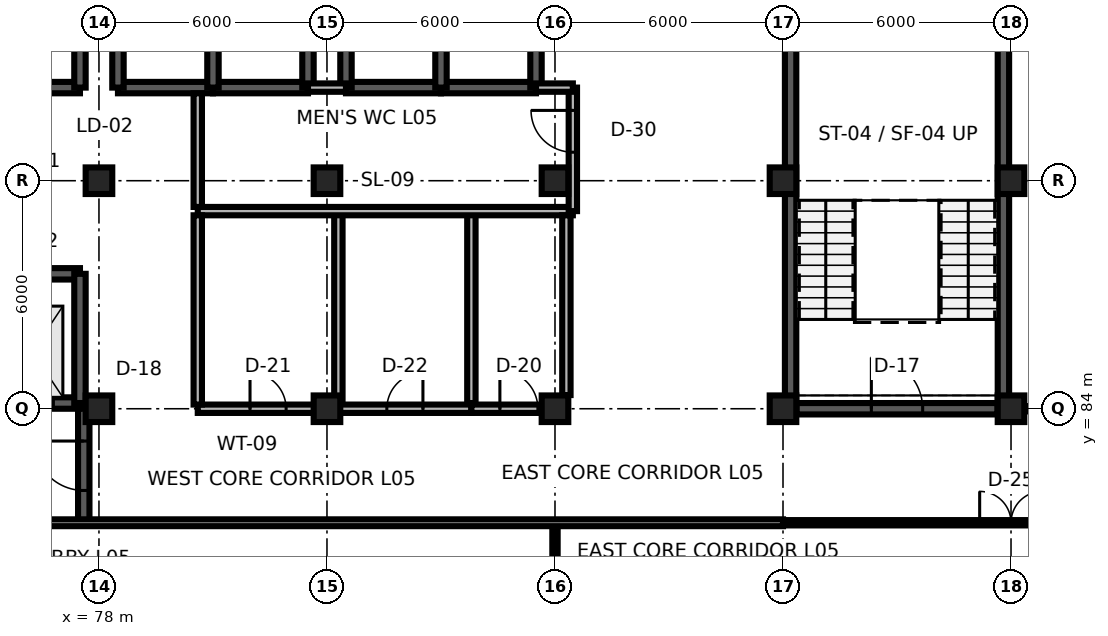
"""IFC4 building model, lengths in metres.
Left out: names, types, materials, properties, quantities, classifications, styles, units other than length and angle.
Written with IfcOpenShell. Run it as: python <this file> out.ifc"""

import sys

from ifc_helpers import new_model, si_unit, direction, frame, frame_2d, origin, origin_2d, place, context, subcontext, project, spatial, rectangle, extrude, element, fill, save


model = new_model("IFC4")
c1 = context("Model", 3, precision=1e-05, world=origin(), true_north=direction((0.0, 1.0)))
c2 = subcontext(c1, "Body", "Model", "MODEL_VIEW")
j1 = project(units=[si_unit("LENGTHUNIT", "METRE"), si_unit("PLANEANGLEUNIT", "RADIAN")], contexts=[c1])
p1 = place(None, origin())
s1 = spatial("IfcSite", under=j1, at=p1, CompositionType="ELEMENT")
p2 = place(p1, origin())
s2 = spatial("IfcBuilding", under=s1, at=p2, CompositionType="ELEMENT")
p3 = place(p2, frame((0.0, 0.0, 21.0)))
s3 = spatial("IfcBuildingStorey", under=s2, at=p3, CompositionType="ELEMENT", Elevation=21.0)
for number, where, z_axis, x_axis in (
    (1, (78.0, 84.0, 0.0), (0.0, 0.0, 1.0), (1.0, 0.0, 0.0)),
    (2, (84.0, 84.0, 0.0), (0.0, 0.0, 1.0), (1.0, 0.0, 0.0)),
    (3, (90.0, 84.0, 0.0), (0.0, 0.0, 1.0), (1.0, 0.0, 0.0)),
    (4, (96.0, 84.0, 0.0), (0.0, 0.0, 1.0), (1.0, 0.0, 0.0)),
    (5, (102.0, 84.0, 0.0), (0.0, 0.0, 1.0), (1.0, 0.0, 0.0)),
    (6, (78.0, 90.0, 0.0), (0.0, 0.0, 1.0), (1.0, 0.0, 0.0)),
    (7, (84.0, 90.0, 0.0), (0.0, 0.0, 1.0), (1.0, 0.0, 0.0)),
    (8, (90.0, 90.0, 0.0), (0.0, 0.0, 1.0), (1.0, 0.0, 0.0)),
    (9, (96.0, 90.0, 0.0), (0.0, 0.0, 1.0), (1.0, 0.0, 0.0)),
    (10, (102.0, 90.0, 0.0), (0.0, 0.0, 1.0), (1.0, 0.0, 0.0)),
):
    element("IfcColumn", number, at=place(p3, frame(where, z_axis=z_axis, x_axis=x_axis)), inside=s3, PredefinedType="COLUMN", context=c2, shape_type="SweptSolid", body=[
        extrude(rectangle(XDim=0.7, YDim=0.7, at=origin_2d()), origin(), (0.0, 0.0, 1.0), 3.9),
    ])
p4 = place(p3, frame((96.35, 84.0, 0.0), z_axis=(0.0, 0.0, 1.0), x_axis=(1.0, 0.0, 0.0)))
e11 = element("IfcWall", 11, at=p4, inside=s3, PredefinedType="SHEAR", context=c2, shape_type="SweptSolid", body=[
    extrude(rectangle(XDim=5.3, YDim=0.3, at=frame_2d((2.65, 0.0))), origin(), (0.0, 0.0, 1.0), 3.66),
])
p5 = place(p4, frame((1.975, 0.0, 0.0)))
e12 = element("IfcOpeningElement", 12, at=p5, cuts=e11, PredefinedType="OPENING", context=c2, shape_type="SweptSolid", body=[
    extrude(rectangle(XDim=1.35, YDim=2.2, at=frame_2d((0.675, 1.1))), frame((0.0, 0.165, 0.0), z_axis=(0.0, -1.0, 0.0), x_axis=(1.0, 0.0, 0.0)), (0.0, 0.0, 1.0), 0.33),
])
for number, where, z_axis, x_axis in (
    (13, (96.2, 84.0, 0.0), (0.0, 0.0, 1.0), (0.0, 1.0, 0.0)),
    (14, (101.8, 84.0, 0.0), (0.0, 0.0, 1.0), (0.0, 1.0, 0.0)),
):
    element("IfcWall", number, at=place(p3, frame(where, z_axis=z_axis, x_axis=x_axis)), inside=s3, PredefinedType="SHEAR", context=c2, shape_type="SweptSolid", body=[
        extrude(rectangle(XDim=11.8, YDim=0.3, at=frame_2d((5.9, 0.0))), origin(), (0.0, 0.0, 1.0), 3.74),
    ])
p6 = place(p3, frame((75.0, 84.15, 0.0), z_axis=(0.0, 0.0, 1.0), x_axis=(1.0, 0.0, 0.0)))
e15 = element("IfcWall", 15, at=p6, inside=s3, PredefinedType="SHEAR", context=c2, shape_type="SweptSolid", body=[
    extrude(rectangle(XDim=2.5, YDim=0.3, at=frame_2d((1.25, 0.0))), origin(), (0.0, 0.0, 1.0), 3.74),
])
p7 = place(p6, frame((0.7, 0.0, 0.0)))
e16 = element("IfcOpeningElement", 16, at=p7, cuts=e15, PredefinedType="OPENING", context=c2, shape_type="SweptSolid", body=[
    extrude(rectangle(XDim=1.1, YDim=2.1, at=frame_2d((0.55, 1.05))), frame((0.0, 0.165, 0.0), z_axis=(0.0, -1.0, 0.0), x_axis=(1.0, 0.0, 0.0)), (0.0, 0.0, 1.0), 0.33),
])
p8 = place(p3, frame((75.0, 87.55, 0.0), z_axis=(0.0, 0.0, 1.0), x_axis=(1.0, 0.0, 0.0)))
e17 = element("IfcWall", 17, at=p8, inside=s3, PredefinedType="SHEAR", context=c2, shape_type="SweptSolid", body=[
    extrude(rectangle(XDim=2.5, YDim=0.3, at=frame_2d((1.25, 0.0))), origin(), (0.0, 0.0, 1.0), 3.74),
])
p9 = place(p3, frame((77.5, 84.15, 0.0), z_axis=(0.0, 0.0, 1.0), x_axis=(0.0, 1.0, 0.0)))
e18 = element("IfcWall", 18, at=p9, inside=s3, PredefinedType="SHEAR", context=c2, shape_type="SweptSolid", body=[
    extrude(rectangle(XDim=3.4, YDim=0.3, at=frame_2d((1.7, 0.0))), origin(), (0.0, 0.0, 1.0), 3.74),
])
p10 = place(p3, frame((75.0, 92.45, 0.0), z_axis=(0.0, 0.0, 1.0), x_axis=(1.0, 0.0, 0.0)))
e19 = element("IfcWall", 19, at=p10, inside=s3, PredefinedType="SHEAR", context=c2, shape_type="SweptSolid", body=[
    extrude(rectangle(XDim=2.5, YDim=0.3, at=frame_2d((1.25, 0.0))), origin(), (0.0, 0.0, 1.0), 3.74),
])
p11 = place(p3, frame((77.5, 92.45, 0.0), z_axis=(0.0, 0.0, 1.0), x_axis=(0.0, 1.0, 0.0)))
e20 = element("IfcWall", 20, at=p11, inside=s3, PredefinedType="SHEAR", context=c2, shape_type="SweptSolid", body=[
    extrude(rectangle(XDim=3.4, YDim=0.3, at=frame_2d((1.7, 0.0))), origin(), (0.0, 0.0, 1.0), 3.74),
])
p12 = place(p3, frame((78.5, 92.45, 0.0), z_axis=(0.0, 0.0, 1.0), x_axis=(1.0, 0.0, 0.0)))
e21 = element("IfcWall", 21, at=p12, inside=s3, PredefinedType="SHEAR", context=c2, shape_type="SweptSolid", body=[
    extrude(rectangle(XDim=2.5, YDim=0.3, at=frame_2d((1.25, 0.0))), origin(), (0.0, 0.0, 1.0), 3.74),
])
p13 = place(p3, frame((78.5, 92.45, 0.0), z_axis=(0.0, 0.0, 1.0), x_axis=(0.0, 1.0, 0.0)))
e22 = element("IfcWall", 22, at=p13, inside=s3, PredefinedType="SHEAR", context=c2, shape_type="SweptSolid", body=[
    extrude(rectangle(XDim=3.4, YDim=0.3, at=frame_2d((1.7, 0.0))), origin(), (0.0, 0.0, 1.0), 3.74),
])
p14 = place(p3, frame((81.0, 92.45, 0.0), z_axis=(0.0, 0.0, 1.0), x_axis=(1.0, 0.0, 0.0)))
e23 = element("IfcWall", 23, at=p14, inside=s3, PredefinedType="SHEAR", context=c2, shape_type="SweptSolid", body=[
    extrude(rectangle(XDim=2.5, YDim=0.3, at=frame_2d((1.25, 0.0))), origin(), (0.0, 0.0, 1.0), 3.74),
])
for number, where, z_axis, x_axis in (
    (24, (81.0, 92.45, 0.0), (0.0, 0.0, 1.0), (0.0, 1.0, 0.0)),
    (25, (83.5, 92.45, 0.0), (0.0, 0.0, 1.0), (0.0, 1.0, 0.0)),
):
    element("IfcWall", number, at=place(p3, frame(where, z_axis=z_axis, x_axis=x_axis)), inside=s3, PredefinedType="SHEAR", context=c2, shape_type="SweptSolid", body=[
        extrude(rectangle(XDim=3.4, YDim=0.3, at=frame_2d((1.7, 0.0))), origin(), (0.0, 0.0, 1.0), 3.74),
    ])
p15 = place(p3, frame((84.5, 92.45, 0.0), z_axis=(0.0, 0.0, 1.0), x_axis=(1.0, 0.0, 0.0)))
e26 = element("IfcWall", 26, at=p15, inside=s3, PredefinedType="SHEAR", context=c2, shape_type="SweptSolid", body=[
    extrude(rectangle(XDim=2.5, YDim=0.3, at=frame_2d((1.25, 0.0))), origin(), (0.0, 0.0, 1.0), 3.74),
])
p16 = place(p3, frame((84.5, 92.45, 0.0), z_axis=(0.0, 0.0, 1.0), x_axis=(0.0, 1.0, 0.0)))
e27 = element("IfcWall", 27, at=p16, inside=s3, PredefinedType="SHEAR", context=c2, shape_type="SweptSolid", body=[
    extrude(rectangle(XDim=3.4, YDim=0.3, at=frame_2d((1.7, 0.0))), origin(), (0.0, 0.0, 1.0), 3.74),
])
p17 = place(p3, frame((87.0, 92.45, 0.0), z_axis=(0.0, 0.0, 1.0), x_axis=(1.0, 0.0, 0.0)))
e28 = element("IfcWall", 28, at=p17, inside=s3, PredefinedType="SHEAR", context=c2, shape_type="SweptSolid", body=[
    extrude(rectangle(XDim=2.5, YDim=0.3, at=frame_2d((1.25, 0.0))), origin(), (0.0, 0.0, 1.0), 3.74),
])
for number, where, z_axis, x_axis in (
    (29, (87.0, 92.45, 0.0), (0.0, 0.0, 1.0), (0.0, 1.0, 0.0)),
    (30, (89.5, 92.45, 0.0), (0.0, 0.0, 1.0), (0.0, 1.0, 0.0)),
):
    element("IfcWall", number, at=place(p3, frame(where, z_axis=z_axis, x_axis=x_axis)), inside=s3, PredefinedType="SHEAR", context=c2, shape_type="SweptSolid", body=[
        extrude(rectangle(XDim=3.4, YDim=0.3, at=frame_2d((1.7, 0.0))), origin(), (0.0, 0.0, 1.0), 3.74),
    ])
p18 = place(p3, frame((77.6, 81.0, 0.0), z_axis=(0.0, 0.0, 1.0), x_axis=(0.0, 1.0, 0.0)))
e31 = element("IfcWall", 31, at=p18, inside=s3, PredefinedType="SHEAR", context=c2, shape_type="SweptSolid", body=[
    extrude(rectangle(XDim=3.0, YDim=0.3, at=frame_2d((1.5, 0.0))), origin(), (0.0, 0.0, 1.0), 3.7),
])
p19 = place(p18, frame((0.85, 0.0, 0.0)))
e32 = element("IfcOpeningElement", 32, at=p19, cuts=e31, PredefinedType="OPENING", context=c2, shape_type="SweptSolid", body=[
    extrude(rectangle(XDim=1.3, YDim=2.2, at=frame_2d((0.65, 1.1))), frame((0.0, 0.165, 0.0), z_axis=(0.0, -1.0, 0.0), x_axis=(1.0, 0.0, 0.0)), (0.0, 0.0, 1.0), 0.33),
])
p20 = place(p3, frame((80.6, 84.0, 0.0), z_axis=(0.0, 0.0, 1.0), x_axis=(1.0, 0.0, 0.0)))
e33 = element("IfcWall", 33, at=p20, inside=s3, PredefinedType="PARTITIONING", context=c2, shape_type="SweptSolid", body=[
    extrude(rectangle(XDim=3.7, YDim=0.22, at=frame_2d((1.85, 0.0))), origin(), (0.0, 0.0, 1.0), 3.312),
])
p21 = place(p20, frame((1.375, 0.0, 0.0)))
e34 = element("IfcOpeningElement", 34, at=p21, cuts=e33, PredefinedType="OPENING", context=c2, shape_type="SweptSolid", body=[
    extrude(rectangle(XDim=0.95, YDim=2.15, at=frame_2d((0.475, 1.075))), frame((0.0, 0.125, 0.0), z_axis=(0.0, -1.0, 0.0), x_axis=(1.0, 0.0, 0.0)), (0.0, 0.0, 1.0), 0.25),
])
p22 = place(p3, frame((84.3, 84.0, 0.0), z_axis=(0.0, 0.0, 1.0), x_axis=(1.0, 0.0, 0.0)))
e35 = element("IfcWall", 35, at=p22, inside=s3, PredefinedType="PARTITIONING", context=c2, shape_type="SweptSolid", body=[
    extrude(rectangle(XDim=3.5, YDim=0.22, at=frame_2d((1.75, 0.0))), origin(), (0.0, 0.0, 1.0), 3.312),
])
p23 = place(p22, frame((1.275, 0.0, 0.0)))
e36 = element("IfcOpeningElement", 36, at=p23, cuts=e35, PredefinedType="OPENING", context=c2, shape_type="SweptSolid", body=[
    extrude(rectangle(XDim=0.95, YDim=2.1, at=frame_2d((0.475, 1.05))), frame((0.0, 0.125, 0.0), z_axis=(0.0, -1.0, 0.0), x_axis=(1.0, 0.0, 0.0)), (0.0, 0.0, 1.0), 0.25),
])
p24 = place(p3, frame((87.8, 84.0, 0.0), z_axis=(0.0, 0.0, 1.0), x_axis=(1.0, 0.0, 0.0)))
e37 = element("IfcWall", 37, at=p24, inside=s3, PredefinedType="PARTITIONING", context=c2, shape_type="SweptSolid", body=[
    extrude(rectangle(XDim=2.5, YDim=0.22, at=frame_2d((1.25, 0.0))), origin(), (0.0, 0.0, 1.0), 3.312),
])
p25 = place(p24, frame((0.75, 0.0, 0.0)))
e38 = element("IfcOpeningElement", 38, at=p25, cuts=e37, PredefinedType="OPENING", context=c2, shape_type="SweptSolid", body=[
    extrude(rectangle(XDim=1.0, YDim=2.15, at=frame_2d((0.5, 1.075))), frame((0.0, 0.125, 0.0), z_axis=(0.0, -1.0, 0.0), x_axis=(1.0, 0.0, 0.0)), (0.0, 0.0, 1.0), 0.25),
])
for number, where, z_axis, x_axis in (
    (39, (84.3, 84.15, 0.0), (0.0, 0.0, 1.0), (0.0, 1.0, 0.0)),
    (40, (87.8, 84.15, 0.0), (0.0, 0.0, 1.0), (0.0, 1.0, 0.0)),
):
    element("IfcWall", number, at=place(p3, frame(where, z_axis=z_axis, x_axis=x_axis)), inside=s3, PredefinedType="PARTITIONING", context=c2, shape_type="SweptSolid", body=[
        extrude(rectangle(XDim=5.0, YDim=0.22, at=frame_2d((2.5, 0.0))), origin(), (0.0, 0.0, 1.0), 3.7),
    ])
p26 = place(p3, frame((80.6, 89.2, 0.0), z_axis=(0.0, 0.0, 1.0), x_axis=(1.0, 0.0, 0.0)))
e41 = element("IfcWall", 41, at=p26, inside=s3, PredefinedType="PARTITIONING", context=c2, shape_type="SweptSolid", body=[
    extrude(rectangle(XDim=9.87, YDim=0.22, at=frame_2d((4.935, 0.0))), origin(), (0.0, 0.0, 1.0), 3.7),
])
p27 = place(p3, frame((90.47, 89.2, 0.0), z_axis=(0.0, 0.0, 1.0), x_axis=(0.0, 1.0, 0.0)))
e42 = element("IfcWall", 42, at=p27, inside=s3, PredefinedType="PARTITIONING", context=c2, shape_type="SweptSolid", body=[
    extrude(rectangle(XDim=3.25, YDim=0.22, at=frame_2d((1.625, 0.0))), origin(), (0.0, 0.0, 1.0), 3.7),
])
p28 = place(p27, frame((1.55, 0.0, 0.0)))
e43 = element("IfcOpeningElement", 43, at=p28, cuts=e42, PredefinedType="OPENING", context=c2, shape_type="SweptSolid", body=[
    extrude(rectangle(XDim=1.1, YDim=2.15, at=frame_2d((0.55, 1.075))), frame((0.0, 0.125, 0.0), z_axis=(0.0, -1.0, 0.0), x_axis=(1.0, 0.0, 0.0)), (0.0, 0.0, 1.0), 0.25),
])
p29 = place(p3, frame((96.0, 81.0, 0.0), z_axis=(0.0, 0.0, 1.0), x_axis=(1.0, 0.0, 0.0)))
e44 = element("IfcWall", 44, at=p29, inside=s3, PredefinedType="PARTITIONING", context=c2, shape_type="SweptSolid", body=[
    extrude(rectangle(XDim=12.0, YDim=0.14, at=frame_2d((6.0, 0.0))), origin(), (0.0, 0.0, 1.0), 3.7),
])
p30 = place(p29, frame((5.175, 0.0, 0.0)))
e45 = element("IfcOpeningElement", 45, at=p30, cuts=e44, PredefinedType="OPENING", context=c2, shape_type="SweptSolid", body=[
    extrude(rectangle(XDim=1.65, YDim=2.35, at=frame_2d((0.825, 1.175))), frame((0.0, 0.085, 0.0), z_axis=(0.0, -1.0, 0.0), x_axis=(1.0, 0.0, 0.0)), (0.0, 0.0, 1.0), 0.17),
])
p31 = place(p3, frame((102.0, 84.0, 0.0), z_axis=(0.0, 0.0, 1.0), x_axis=(1.0, 0.0, 0.0)))
e46 = element("IfcWall", 46, at=p31, inside=s3, PredefinedType="PARTITIONING", context=c2, shape_type="SweptSolid", body=[
    extrude(rectangle(XDim=6.0, YDim=0.14, at=frame_2d((3.0, 0.0))), origin(), (0.0, 0.0, 1.0), 3.312),
])
p32 = place(p31, frame((2.175, 0.0, 0.0)))
e47 = element("IfcOpeningElement", 47, at=p32, cuts=e46, PredefinedType="OPENING", context=c2, shape_type="SweptSolid", body=[
    extrude(rectangle(XDim=1.65, YDim=2.35, at=frame_2d((0.825, 1.175))), frame((0.0, 0.085, 0.0), z_axis=(0.0, -1.0, 0.0), x_axis=(1.0, 0.0, 0.0)), (0.0, 0.0, 1.0), 0.17),
])
p33 = place(p3, frame((90.0, 72.65, 0.0), z_axis=(0.0, 0.0, 1.0), x_axis=(0.0, 1.0, 0.0)))
e48 = element("IfcWall", 48, at=p33, inside=s3, PredefinedType="PARTITIONING", context=c2, shape_type="SweptSolid", body=[
    extrude(rectangle(XDim=8.35, YDim=0.14, at=frame_2d((4.175, 0.0))), origin(), (0.0, 0.0, 1.0), 3.312),
])
p34 = place(p3, frame((80.6, 84.11, 0.0), z_axis=(0.0, 0.0, 1.0), x_axis=(0.0, 1.0, 0.0)))
e49 = element("IfcWall", 49, at=p34, inside=s3, PredefinedType="PARTITIONING", context=c2, shape_type="SweptSolid", body=[
    extrude(rectangle(XDim=4.98, YDim=0.22, at=frame_2d((2.49, 0.0))), origin(), (0.0, 0.0, 1.0), 3.7),
])
p35 = place(p3, frame((90.3, 84.36, 0.0), z_axis=(0.0, 0.0, 1.0), x_axis=(0.0, 1.0, 0.0)))
e50 = element("IfcWall", 50, at=p35, inside=s3, PredefinedType="PARTITIONING", context=c2, shape_type="SweptSolid", body=[
    extrude(rectangle(XDim=4.73, YDim=0.22, at=frame_2d((2.365, 0.0))), origin(), (0.0, 0.0, 1.0), 3.7),
])
p36 = place(p3, frame((80.6, 89.31, 0.0), z_axis=(0.0, 0.0, 1.0), x_axis=(0.0, 1.0, 0.0)))
e51 = element("IfcWall", 51, at=p36, inside=s3, PredefinedType="PARTITIONING", context=c2, shape_type="SweptSolid", body=[
    extrude(rectangle(XDim=2.99, YDim=0.22, at=frame_2d((1.495, 0.0))), origin(), (0.0, 0.0, 1.0), 3.7),
])
p37 = place(p3, frame((83.5, 92.45, 0.0), z_axis=(0.0, 0.0, 1.0), x_axis=(1.0, 0.0, 0.0)))
e52 = element("IfcWall", 52, at=p37, inside=s3, PredefinedType="PARTITIONING", context=c2, shape_type="SweptSolid", body=[
    extrude(rectangle(XDim=1.0, YDim=0.22, at=frame_2d((0.5, 0.0))), origin(), (0.0, 0.0, 1.0), 3.7),
])
p38 = place(p3, frame((89.5, 92.45, 0.0), z_axis=(0.0, 0.0, 1.0), x_axis=(1.0, 0.0, 0.0)))
e53 = element("IfcWall", 53, at=p38, inside=s3, PredefinedType="PARTITIONING", context=c2, shape_type="SweptSolid", body=[
    extrude(rectangle(XDim=0.97, YDim=0.22, at=frame_2d((0.485, 0.0))), origin(), (0.0, 0.0, 1.0), 3.7),
])
p39 = place(p3, frame((72.0, 81.0, 0.0), z_axis=(0.0, 0.0, 1.0), x_axis=(1.0, 0.0, 0.0)))
e54 = element("IfcWall", 54, at=p39, inside=s3, PredefinedType="PARTITIONING", context=c2, shape_type="SweptSolid", body=[
    extrude(rectangle(XDim=24.0, YDim=0.18, at=frame_2d((12.0, 0.0))), origin(), (0.0, 0.0, 1.0), 3.7),
])
p40 = place(p5, origin())
e55 = element("IfcDoor", 55, at=p40, inside=s3, OperationType="SINGLE_SWING_LEFT", PredefinedType="DOOR", context=c2, shape_type="SweptSolid", body=[
    extrude(rectangle(XDim=1.35, YDim=2.2, at=frame_2d((0.675, 1.1))), frame((0.0, 0.025, 0.0), z_axis=(0.0, -1.0, 0.0), x_axis=(1.0, 0.0, 0.0)), (0.0, 0.0, 1.0), 0.05),
])
fill(e12, e55)
p41 = place(p7, origin())
e56 = element("IfcDoor", 56, at=p41, inside=s3, OperationType="DOUBLE_DOOR_SLIDING", PredefinedType="DOOR", context=c2, shape_type="SweptSolid", body=[
    extrude(rectangle(XDim=1.1, YDim=2.1, at=frame_2d((0.55, 1.05))), frame((0.0, 0.025, 0.0), z_axis=(0.0, -1.0, 0.0), x_axis=(1.0, 0.0, 0.0)), (0.0, 0.0, 1.0), 0.05),
])
fill(e16, e56)
p42 = place(p19, origin())
e57 = element("IfcDoor", 57, at=p42, inside=s3, OperationType="SINGLE_SWING_RIGHT", PredefinedType="DOOR", context=c2, shape_type="SweptSolid", body=[
    extrude(rectangle(XDim=1.3, YDim=2.2, at=frame_2d((0.65, 1.1))), frame((0.0, 0.025, 0.0), z_axis=(0.0, -1.0, 0.0), x_axis=(1.0, 0.0, 0.0)), (0.0, 0.0, 1.0), 0.05),
])
fill(e32, e57)
p43 = place(p21, origin())
e58 = element("IfcDoor", 58, at=p43, inside=s3, OperationType="SINGLE_SWING_LEFT", PredefinedType="DOOR", context=c2, shape_type="SweptSolid", body=[
    extrude(rectangle(XDim=0.95, YDim=2.15, at=frame_2d((0.475, 1.075))), frame((0.0, 0.025, 0.0), z_axis=(0.0, -1.0, 0.0), x_axis=(1.0, 0.0, 0.0)), (0.0, 0.0, 1.0), 0.05),
])
fill(e34, e58)
p44 = place(p23, origin())
e59 = element("IfcDoor", 59, at=p44, inside=s3, OperationType="SINGLE_SWING_RIGHT", PredefinedType="DOOR", context=c2, shape_type="SweptSolid", body=[
    extrude(rectangle(XDim=0.95, YDim=2.1, at=frame_2d((0.475, 1.05))), frame((0.0, 0.025, 0.0), z_axis=(0.0, -1.0, 0.0), x_axis=(1.0, 0.0, 0.0)), (0.0, 0.0, 1.0), 0.05),
])
fill(e36, e59)
p45 = place(p25, origin())
e60 = element("IfcDoor", 60, at=p45, inside=s3, OperationType="SINGLE_SWING_LEFT", PredefinedType="DOOR", context=c2, shape_type="SweptSolid", body=[
    extrude(rectangle(XDim=1.0, YDim=2.15, at=frame_2d((0.5, 1.075))), frame((0.0, 0.025, 0.0), z_axis=(0.0, -1.0, 0.0), x_axis=(1.0, 0.0, 0.0)), (0.0, 0.0, 1.0), 0.05),
])
fill(e38, e60)
p46 = place(p28, origin())
e61 = element("IfcDoor", 61, at=p46, inside=s3, OperationType="SINGLE_SWING_RIGHT", PredefinedType="DOOR", context=c2, shape_type="SweptSolid", body=[
    extrude(rectangle(XDim=1.1, YDim=2.15, at=frame_2d((0.55, 1.075))), frame((0.0, 0.025, 0.0), z_axis=(0.0, -1.0, 0.0), x_axis=(1.0, 0.0, 0.0)), (0.0, 0.0, 1.0), 0.05),
])
fill(e43, e61)
p47 = place(p30, origin())
e62 = element("IfcDoor", 62, at=p47, inside=s3, OperationType="DOUBLE_DOOR_SINGLE_SWING", PredefinedType="DOOR", context=c2, shape_type="SweptSolid", body=[
    extrude(rectangle(XDim=1.65, YDim=2.35, at=frame_2d((0.825, 1.175))), frame((0.0, 0.025, 0.0), z_axis=(0.0, -1.0, 0.0), x_axis=(1.0, 0.0, 0.0)), (0.0, 0.0, 1.0), 0.05),
])
fill(e45, e62)
save(model, sys.argv[1])
